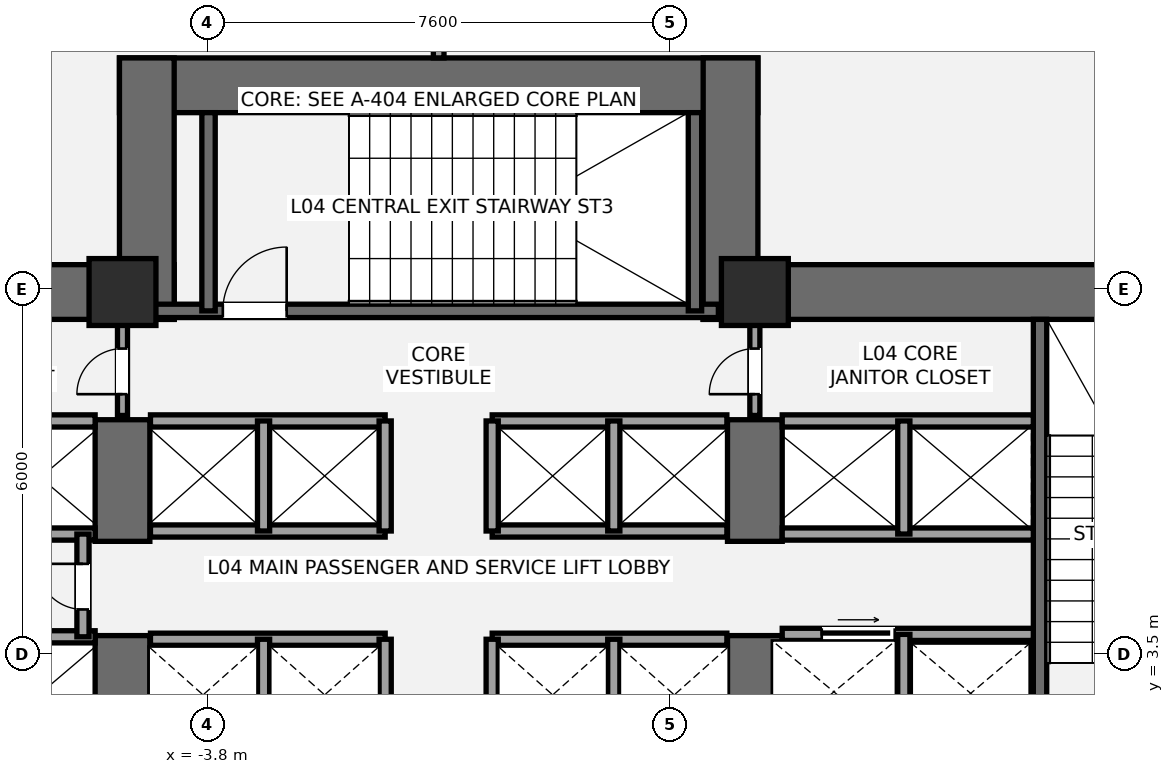
"""IFC4 building model, lengths in metres.
Left out: names, types, materials, properties, quantities, classifications, styles, units other than length and angle.
Written with IfcOpenShell. Run it as: python <this file> out.ifc"""

import sys

from ifc_helpers import new_model, si_unit, direction, frame, frame_2d, origin, origin_2d, place, context, subcontext, project, spatial, rectangle, extrude, element, fill, save


model = new_model("IFC4")
c1 = context("Model", 3, precision=1e-05, world=origin(), true_north=direction((0.0, 1.0)))
c2 = subcontext(c1, "Body", "Model", "MODEL_VIEW")
j1 = project(units=[si_unit("LENGTHUNIT", "METRE"), si_unit("PLANEANGLEUNIT", "RADIAN")], contexts=[c1])
p1 = place(None, origin())
s1 = spatial("IfcSite", under=j1, at=p1, CompositionType="ELEMENT")
p2 = place(p1, origin())
s2 = spatial("IfcBuilding", under=s1, at=p2, CompositionType="ELEMENT")
p3 = place(p2, frame((0.0, 0.0, 18.6)))
s3 = spatial("IfcBuildingStorey", under=s2, at=p3, CompositionType="ELEMENT", Elevation=18.6)
p4 = place(p3, frame((-14.05, 9.45, 0.0), z_axis=(0.0, 0.0, 1.0), x_axis=(1.0, 0.0, 0.0)))
e1 = element("IfcWall", 1, at=p4, inside=s3, PredefinedType="SHEAR", context=c2, shape_type="SweptSolid", body=[
    extrude(rectangle(XDim=9.7, YDim=0.9, at=frame_2d((4.85, 0.0))), origin(), (0.0, 0.0, 1.0), 4.2),
])
p5 = place(p3, frame((-5.2, 0.95, 0.0), z_axis=(0.0, 0.0, 1.0), x_axis=(0.0, 1.0, 0.0)))
e2 = element("IfcWall", 2, at=p5, inside=s3, PredefinedType="SHEAR", context=c2, shape_type="SweptSolid", body=[
    extrude(rectangle(XDim=2.85, YDim=0.9, at=frame_2d((1.425, 0.0))), origin(), (0.0, 0.0, 1.0), 4.2),
])
p6 = place(p3, frame((-5.2, 5.35, 0.0), z_axis=(0.0, 0.0, 1.0), x_axis=(0.0, 1.0, 0.0)))
e3 = element("IfcWall", 3, at=p6, inside=s3, PredefinedType="SHEAR", context=c2, shape_type="SweptSolid", body=[
    extrude(rectangle(XDim=2.0, YDim=0.9, at=frame_2d((1.0, 0.0))), origin(), (0.0, 0.0, 1.0), 4.2),
])
p7 = place(p3, frame((4.35, 9.45, 0.0), z_axis=(0.0, 0.0, 1.0), x_axis=(1.0, 0.0, 0.0)))
e4 = element("IfcWall", 4, at=p7, inside=s3, PredefinedType="SHEAR", context=c2, shape_type="SweptSolid", body=[
    extrude(rectangle(XDim=9.7, YDim=0.9, at=frame_2d((4.85, 0.0))), origin(), (0.0, 0.0, 1.0), 4.2),
])
p8 = place(p3, frame((5.2, 0.95, 0.0), z_axis=(0.0, 0.0, 1.0), x_axis=(0.0, 1.0, 0.0)))
e5 = element("IfcWall", 5, at=p8, inside=s3, PredefinedType="SHEAR", context=c2, shape_type="SweptSolid", body=[
    extrude(rectangle(XDim=2.85, YDim=0.9, at=frame_2d((1.425, 0.0))), origin(), (0.0, 0.0, 1.0), 4.2),
])
p9 = place(p3, frame((5.2, 5.35, 0.0), z_axis=(0.0, 0.0, 1.0), x_axis=(0.0, 1.0, 0.0)))
e6 = element("IfcWall", 6, at=p9, inside=s3, PredefinedType="SHEAR", context=c2, shape_type="SweptSolid", body=[
    extrude(rectangle(XDim=2.0, YDim=0.9, at=frame_2d((1.0, 0.0))), origin(), (0.0, 0.0, 1.0), 4.2),
])
p10 = place(p3, frame((9.89, 1.85, 0.0), z_axis=(0.0, 0.0, 1.0), x_axis=(0.0, 1.0, 0.0)))
e7 = element("IfcWall", 7, at=p10, inside=s3, PredefinedType="SHEAR", context=c2, shape_type="SweptSolid", body=[
    extrude(rectangle(XDim=7.15, YDim=0.22, at=frame_2d((3.575, 0.0))), origin(), (0.0, 0.0, 1.0), 4.2),
])
p11 = place(p3, frame((-5.25, 12.85, 0.0), z_axis=(0.0, 0.0, 1.0), x_axis=(1.0, 0.0, 0.0)))
e8 = element("IfcWall", 8, at=p11, inside=s3, PredefinedType="SHEAR", context=c2, shape_type="SweptSolid", body=[
    extrude(rectangle(XDim=10.5, YDim=0.9, at=frame_2d((5.25, 0.0))), origin(), (0.0, 0.0, 1.0), 4.2),
])
for number, where, z_axis, x_axis in (
    (9, (-4.8, 9.0, 0.0), (0.0, 0.0, 1.0), (0.0, 1.0, 0.0)),
    (10, (4.8, 9.0, 0.0), (0.0, 0.0, 1.0), (0.0, 1.0, 0.0)),
):
    element("IfcWall", number, at=place(p3, frame(where, z_axis=z_axis, x_axis=x_axis)), inside=s3, PredefinedType="SHEAR", context=c2, shape_type="SweptSolid", body=[
        extrude(rectangle(XDim=4.3, YDim=0.9, at=frame_2d((2.15, 0.0))), origin(), (0.0, 0.0, 1.0), 4.2),
    ])
p12 = place(p3, frame((-4.7, 9.14, 0.0), z_axis=(0.0, 0.0, 1.0), x_axis=(1.0, 0.0, 0.0)))
e11 = element("IfcWall", 11, at=p12, inside=s3, PredefinedType="SHEAR", context=c2, shape_type="SweptSolid", body=[
    extrude(rectangle(XDim=9.3, YDim=0.22, at=frame_2d((4.65, 0.0))), origin(), (0.0, 0.0, 1.0), 4.2),
])
p13 = place(p12, frame((1.15, 0.0, 0.0)))
e12 = element("IfcOpeningElement", 12, at=p13, cuts=e11, PredefinedType="OPENING", context=c2, shape_type="SweptSolid", body=[
    extrude(rectangle(XDim=1.05, YDim=2.15, at=frame_2d((0.525, 1.075))), frame((0.0, 0.12, 0.0), z_axis=(0.0, -1.0, 0.0), x_axis=(1.0, 0.0, 0.0)), (0.0, 0.0, 1.0), 0.24),
])
for number, where, z_axis, x_axis in (
    (13, (-3.785, 9.14, 0.0), (0.0, 0.0, 1.0), (0.0, 1.0, 0.0)),
    (14, (4.215, 9.14, 0.0), (0.0, 0.0, 1.0), (0.0, 1.0, 0.0)),
):
    element("IfcWall", number, at=place(p3, frame(where, z_axis=z_axis, x_axis=x_axis)), inside=s3, PredefinedType="SHEAR", context=c2, shape_type="SweptSolid", body=[
        extrude(rectangle(XDim=3.26, YDim=0.22, at=frame_2d((1.63, 0.0))), origin(), (0.0, 0.0, 1.0), 4.2),
    ])
for number, where, z_axis, x_axis in (
    (15, (-5.2, 9.45, 0.0), (0.0, 0.0, 1.0), (1.0, 0.0, 0.0)),
    (16, (5.2, 9.45, 0.0), (0.0, 0.0, 1.0), (1.0, 0.0, 0.0)),
):
    element("IfcColumn", number, at=place(p3, frame(where, z_axis=z_axis, x_axis=x_axis)), inside=s3, PredefinedType="COLUMN", context=c2, shape_type="SweptSolid", body=[
        extrude(rectangle(XDim=1.1, YDim=1.1, at=origin_2d()), origin(), (0.0, 0.0, 1.0), 4.2),
    ])
for number, where, z_axis, x_axis in (
    (17, (-9.78, 3.78, 0.0), (0.0, 0.0, 1.0), (1.0, 0.0, 0.0)),
    (18, (-9.78, 5.47, 0.0), (0.0, 0.0, 1.0), (1.0, 0.0, 0.0)),
    (19, (-9.78, 7.33, 0.0), (0.0, 0.0, 1.0), (1.0, 0.0, 0.0)),
):
    element("IfcWall", number, at=place(p3, frame(where, z_axis=z_axis, x_axis=x_axis)), inside=s3, PredefinedType="SOLIDWALL", context=c2, shape_type="SweptSolid", body=[
        extrude(rectangle(XDim=4.13, YDim=0.2, at=frame_2d((2.065, 0.0))), origin(), (0.0, 0.0, 1.0), 3.98),
    ])
p14 = place(p3, frame((-5.85, 3.78, 0.0), z_axis=(0.0, 0.0, 1.0), x_axis=(0.0, 1.0, 0.0)))
e20 = element("IfcWall", 20, at=p14, inside=s3, PredefinedType="SOLIDWALL", context=c2, shape_type="SweptSolid", body=[
    extrude(rectangle(XDim=1.69, YDim=0.2, at=frame_2d((0.845, 0.0))), origin(), (0.0, 0.0, 1.0), 3.98),
])
p15 = place(p14, frame((0.45, 0.0, 0.0)))
e21 = element("IfcOpeningElement", 21, at=p15, cuts=e20, PredefinedType="OPENING", context=c2, shape_type="SweptSolid", body=[
    extrude(rectangle(XDim=0.75, YDim=2.1, at=frame_2d((0.375, 1.05))), frame((0.0, 0.11, 0.0), z_axis=(0.0, -1.0, 0.0), x_axis=(1.0, 0.0, 0.0)), (0.0, 0.0, 1.0), 0.22),
])
p16 = place(p3, frame((5.65, 3.82, 0.0), z_axis=(0.0, 0.0, 1.0), x_axis=(1.0, 0.0, 0.0)))
e22 = element("IfcWall", 22, at=p16, inside=s3, PredefinedType="SOLIDWALL", context=c2, shape_type="SweptSolid", body=[
    extrude(rectangle(XDim=4.13, YDim=0.2, at=frame_2d((2.065, 0.0))), origin(), (0.0, 0.0, 1.0), 3.98),
])
p17 = place(p16, frame((0.65, 0.0, 0.0)))
e23 = element("IfcOpeningElement", 23, at=p17, cuts=e22, PredefinedType="OPENING", context=c2, shape_type="SweptSolid", body=[
    extrude(rectangle(XDim=1.2, YDim=2.2, at=frame_2d((0.6, 1.1))), frame((0.0, 0.11, 0.0), z_axis=(0.0, -1.0, 0.0), x_axis=(1.0, 0.0, 0.0)), (0.0, 0.0, 1.0), 0.22),
])
p18 = place(p3, frame((7.65, 1.85, 0.0), z_axis=(0.0, 0.0, 1.0), x_axis=(0.0, 1.0, 0.0)))
e24 = element("IfcWall", 24, at=p18, inside=s3, PredefinedType="SOLIDWALL", context=c2, shape_type="SweptSolid", body=[
    extrude(rectangle(XDim=1.97, YDim=0.2, at=frame_2d((0.985, 0.0))), origin(), (0.0, 0.0, 1.0), 3.98),
])
for number, where, z_axis, x_axis in (
    (25, (5.65, 5.47, 0.0), (0.0, 0.0, 1.0), (1.0, 0.0, 0.0)),
    (26, (5.65, 7.33, 0.0), (0.0, 0.0, 1.0), (1.0, 0.0, 0.0)),
):
    element("IfcWall", number, at=place(p3, frame(where, z_axis=z_axis, x_axis=x_axis)), inside=s3, PredefinedType="SOLIDWALL", context=c2, shape_type="SweptSolid", body=[
        extrude(rectangle(XDim=4.13, YDim=0.2, at=frame_2d((2.065, 0.0))), origin(), (0.0, 0.0, 1.0), 3.98),
    ])
p19 = place(p3, frame((7.65, 5.47, 0.0), z_axis=(0.0, 0.0, 1.0), x_axis=(0.0, 1.0, 0.0)))
e27 = element("IfcWall", 27, at=p19, inside=s3, PredefinedType="SOLIDWALL", context=c2, shape_type="SweptSolid", body=[
    extrude(rectangle(XDim=1.86, YDim=0.2, at=frame_2d((0.93, 0.0))), origin(), (0.0, 0.0, 1.0), 3.98),
])
for number, where, z_axis, x_axis in (
    (28, (-4.74, 3.74, 0.0), (0.0, 0.0, 1.0), (1.0, 0.0, 0.0)),
    (29, (0.88, 3.74, 0.0), (0.0, 0.0, 1.0), (1.0, 0.0, 0.0)),
):
    element("IfcWall", number, at=place(p3, frame(where, z_axis=z_axis, x_axis=x_axis)), inside=s3, PredefinedType="SOLIDWALL", context=c2, shape_type="SweptSolid", body=[
        extrude(rectangle(XDim=3.86, YDim=0.2, at=frame_2d((1.93, 0.0))), origin(), (0.0, 0.0, 1.0), 3.98),
    ])
for number, where, z_axis, x_axis in (
    (30, (-2.88, 1.92, 0.0), (0.0, 0.0, 1.0), (0.0, 1.0, 0.0)),
    (31, (2.88, 1.92, 0.0), (0.0, 0.0, 1.0), (0.0, 1.0, 0.0)),
    (32, (-0.88, 1.92, 0.0), (0.0, 0.0, 1.0), (0.0, 1.0, 0.0)),
    (33, (0.88, 1.92, 0.0), (0.0, 0.0, 1.0), (0.0, 1.0, 0.0)),
):
    element("IfcWall", number, at=place(p3, frame(where, z_axis=z_axis, x_axis=x_axis)), inside=s3, PredefinedType="SOLIDWALL", context=c2, shape_type="SweptSolid", body=[
        extrude(rectangle(XDim=1.82, YDim=0.2, at=frame_2d((0.91, 0.0))), origin(), (0.0, 0.0, 1.0), 3.98),
    ])
for number, where, z_axis, x_axis in (
    (34, (-4.74, 5.52, 0.0), (0.0, 0.0, 1.0), (1.0, 0.0, 0.0)),
    (35, (0.88, 5.52, 0.0), (0.0, 0.0, 1.0), (1.0, 0.0, 0.0)),
    (36, (-4.74, 7.33, 0.0), (0.0, 0.0, 1.0), (1.0, 0.0, 0.0)),
    (37, (0.88, 7.33, 0.0), (0.0, 0.0, 1.0), (1.0, 0.0, 0.0)),
):
    element("IfcWall", number, at=place(p3, frame(where, z_axis=z_axis, x_axis=x_axis)), inside=s3, PredefinedType="SOLIDWALL", context=c2, shape_type="SweptSolid", body=[
        extrude(rectangle(XDim=3.86, YDim=0.2, at=frame_2d((1.93, 0.0))), origin(), (0.0, 0.0, 1.0), 3.98),
    ])
for number, where, z_axis, x_axis in (
    (38, (-2.88, 5.52, 0.0), (0.0, 0.0, 1.0), (0.0, 1.0, 0.0)),
    (39, (2.88, 5.52, 0.0), (0.0, 0.0, 1.0), (0.0, 1.0, 0.0)),
    (40, (-0.88, 5.52, 0.0), (0.0, 0.0, 1.0), (0.0, 1.0, 0.0)),
    (41, (0.88, 5.52, 0.0), (0.0, 0.0, 1.0), (0.0, 1.0, 0.0)),
):
    element("IfcWall", number, at=place(p3, frame(where, z_axis=z_axis, x_axis=x_axis)), inside=s3, PredefinedType="SOLIDWALL", context=c2, shape_type="SweptSolid", body=[
        extrude(rectangle(XDim=1.81, YDim=0.2, at=frame_2d((0.905, 0.0))), origin(), (0.0, 0.0, 1.0), 3.98),
    ])
p20 = place(p3, frame((-5.2, 7.42, 0.0), z_axis=(0.0, 0.0, 1.0), x_axis=(0.0, 1.0, 0.0)))
e42 = element("IfcWall", 42, at=p20, inside=s3, PredefinedType="PARTITIONING", context=c2, shape_type="SweptSolid", body=[
    extrude(rectangle(XDim=1.58, YDim=0.165, at=frame_2d((0.79, 0.0))), origin(), (0.0, 0.0, 1.0), 3.98),
])
p21 = place(p20, frame((0.35, 0.0, 0.0)))
e43 = element("IfcOpeningElement", 43, at=p21, cuts=e42, PredefinedType="OPENING", context=c2, shape_type="SweptSolid", body=[
    extrude(rectangle(XDim=0.75, YDim=2.1, at=frame_2d((0.375, 1.05))), frame((0.0, 0.093, 0.0), z_axis=(0.0, -1.0, 0.0), x_axis=(1.0, 0.0, 0.0)), (0.0, 0.0, 1.0), 0.185),
])
p22 = place(p3, frame((5.2, 7.42, 0.0), z_axis=(0.0, 0.0, 1.0), x_axis=(0.0, 1.0, 0.0)))
e44 = element("IfcWall", 44, at=p22, inside=s3, PredefinedType="PARTITIONING", context=c2, shape_type="SweptSolid", body=[
    extrude(rectangle(XDim=1.58, YDim=0.165, at=frame_2d((0.79, 0.0))), origin(), (0.0, 0.0, 1.0), 3.98),
])
p23 = place(p22, frame((0.35, 0.0, 0.0)))
e45 = element("IfcOpeningElement", 45, at=p23, cuts=e44, PredefinedType="OPENING", context=c2, shape_type="SweptSolid", body=[
    extrude(rectangle(XDim=0.75, YDim=2.1, at=frame_2d((0.375, 1.05))), frame((0.0, 0.093, 0.0), z_axis=(0.0, -1.0, 0.0), x_axis=(1.0, 0.0, 0.0)), (0.0, 0.0, 1.0), 0.185),
])
p24 = place(p3, frame((0.0, 13.3, 0.0), z_axis=(0.0, 0.0, 1.0), x_axis=(0.0, 1.0, 0.0)))
e46 = element("IfcWall", 46, at=p24, inside=s3, PredefinedType="PARTITIONING", context=c2, shape_type="SweptSolid", body=[
    extrude(rectangle(XDim=8.106, YDim=0.175, at=frame_2d((4.053, 0.0))), origin(), (0.0, 0.0, 1.0), 3.98),
])
p25 = place(p13, origin())
e47 = element("IfcDoor", 47, at=p25, inside=s3, OperationType="SINGLE_SWING_RIGHT", PredefinedType="DOOR", context=c2, shape_type="SweptSolid", body=[
    extrude(rectangle(XDim=1.05, YDim=2.15, at=frame_2d((0.525, 1.075))), frame((0.0, 0.025, 0.0), z_axis=(0.0, -1.0, 0.0), x_axis=(1.0, 0.0, 0.0)), (0.0, 0.0, 1.0), 0.05),
])
fill(e12, e47)
p26 = place(p15, origin())
e48 = element("IfcDoor", 48, at=p26, inside=s3, OperationType="SINGLE_SWING_RIGHT", PredefinedType="DOOR", context=c2, shape_type="SweptSolid", body=[
    extrude(rectangle(XDim=0.75, YDim=2.1, at=frame_2d((0.375, 1.05))), frame((0.0, 0.025, 0.0), z_axis=(0.0, -1.0, 0.0), x_axis=(1.0, 0.0, 0.0)), (0.0, 0.0, 1.0), 0.05),
])
fill(e21, e48)
p27 = place(p17, origin())
e49 = element("IfcDoor", 49, at=p27, inside=s3, OperationType="SLIDING_TO_RIGHT", PredefinedType="DOOR", context=c2, shape_type="SweptSolid", body=[
    extrude(rectangle(XDim=1.2, YDim=2.2, at=frame_2d((0.6, 1.1))), frame((0.0, 0.025, 0.0), z_axis=(0.0, -1.0, 0.0), x_axis=(1.0, 0.0, 0.0)), (0.0, 0.0, 1.0), 0.05),
])
fill(e23, e49)
p28 = place(p21, origin())
e50 = element("IfcDoor", 50, at=p28, inside=s3, OperationType="SINGLE_SWING_LEFT", PredefinedType="DOOR", context=c2, shape_type="SweptSolid", body=[
    extrude(rectangle(XDim=0.75, YDim=2.1, at=frame_2d((0.375, 1.05))), frame((0.0, 0.025, 0.0), z_axis=(0.0, -1.0, 0.0), x_axis=(1.0, 0.0, 0.0)), (0.0, 0.0, 1.0), 0.05),
])
fill(e43, e50)
p29 = place(p23, origin())
e51 = element("IfcDoor", 51, at=p29, inside=s3, OperationType="SINGLE_SWING_LEFT", PredefinedType="DOOR", context=c2, shape_type="SweptSolid", body=[
    extrude(rectangle(XDim=0.75, YDim=2.1, at=frame_2d((0.375, 1.05))), frame((0.0, 0.025, 0.0), z_axis=(0.0, -1.0, 0.0), x_axis=(1.0, 0.0, 0.0)), (0.0, 0.0, 1.0), 0.05),
])
fill(e45, e51)
save(model, sys.argv[1])
